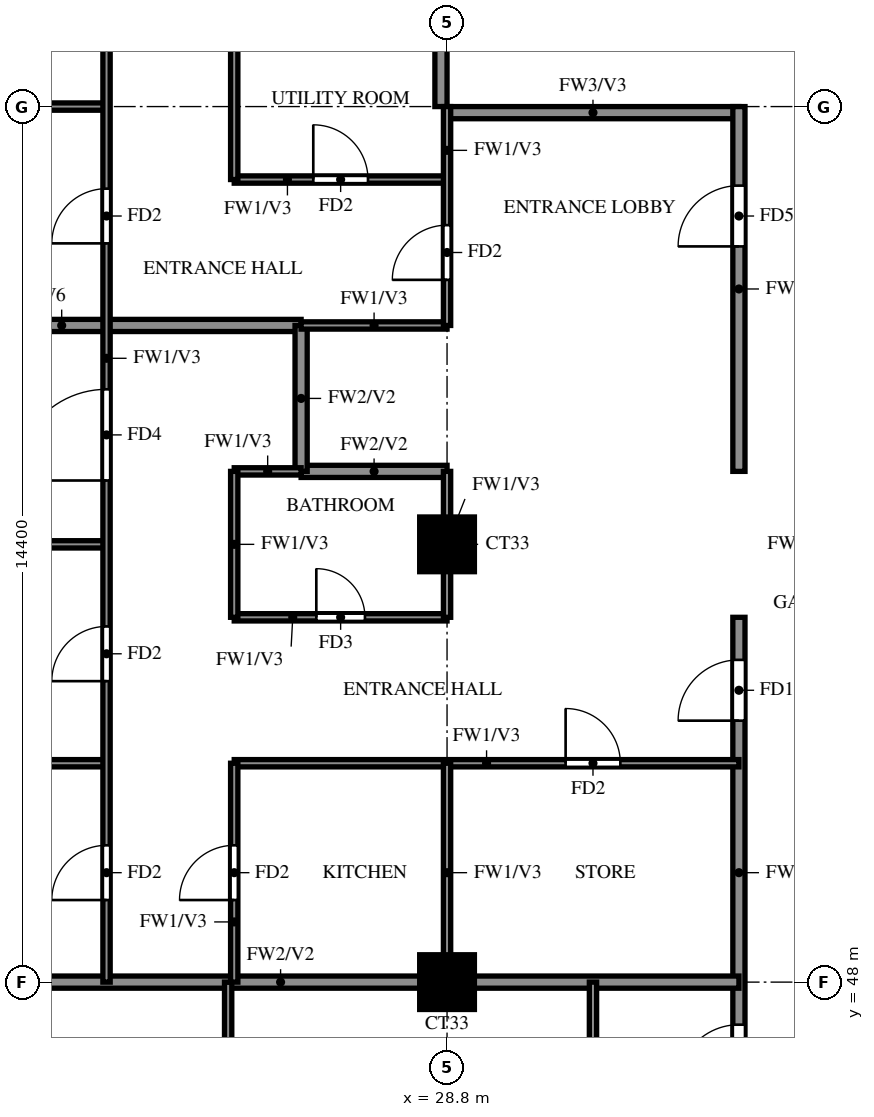
"""IFC4 building model, lengths in metres.
Left out: names, types, materials, properties, quantities, classifications, styles, units other than length and angle.
Written with IfcOpenShell. Run it as: python <this file> out.ifc"""

import sys

from ifc_helpers import new_model, si_unit, direction, frame, frame_2d, origin, origin_2d, place, context, subcontext, project, spatial, rectangle, extrude, source, transform, mapped, element, fill, save


model = new_model("IFC4")
c1 = context("Model", 3, precision=1e-05, world=origin(), true_north=direction((0.0, 1.0)))
c2 = subcontext(c1, "Body", "Model", "MODEL_VIEW")
j1 = project(units=[si_unit("LENGTHUNIT", "METRE"), si_unit("PLANEANGLEUNIT", "RADIAN")], contexts=[c1])
p1 = place(None, origin())
s1 = spatial("IfcSite", under=j1, at=p1, CompositionType="ELEMENT")
p2 = place(p1, origin())
s2 = spatial("IfcBuilding", under=s1, at=p2, CompositionType="ELEMENT")
p3 = place(p2, frame((0.0, 0.0, 215.0)))
s3 = spatial("IfcBuildingStorey", under=s2, at=p3, CompositionType="ELEMENT", Elevation=215.0)
m1 = source(origin(), c2, "Body", "SweptSolid", [
    extrude(rectangle(XDim=0.9, YDim=0.9, at=origin_2d()), origin(), (0.0, 0.0, 1.0), 3.22),
])
for number, where, z_axis, x_axis in (
    (1, (28.8, 48.0, 0.0), (0.0, 0.0, 1.0), (1.0, 0.0, 0.0)),
    (2, (28.8, 55.2, 0.0), (0.0, 0.0, 1.0), (1.0, 0.0, 0.0)),
):
    element("IfcColumn", number, at=place(p3, frame(where, z_axis=z_axis, x_axis=x_axis)), inside=s3, PredefinedType="COLUMN", context=c2, shape_type="MappedRepresentation", body=[
        mapped(m1, transform((0.0, 0.0, 0.0))),
    ])
p4 = place(p3, frame((28.8, 62.3, 0.0), z_axis=(0.0, 0.0, 1.0), x_axis=(1.0, 0.0, 0.0)))
e3 = element("IfcWall", 3, at=p4, inside=s3, PredefinedType="SOLIDWALL", context=c2, shape_type="SweptSolid", body=[
    extrude(rectangle(XDim=4.8, YDim=0.2, at=frame_2d((2.4, 0.0))), origin(), (0.0, 0.0, 1.0), 3.22),
])
p5 = place(p3, frame((28.7, 62.4, 0.0), z_axis=(0.0, 0.0, 1.0), x_axis=(0.0, 1.0, 0.0)))
e4 = element("IfcWall", 4, at=p5, inside=s3, PredefinedType="SOLIDWALL", context=c2, shape_type="SweptSolid", body=[
    extrude(rectangle(XDim=15.6, YDim=0.2, at=frame_2d((7.8, 0.0))), origin(), (0.0, 0.0, 1.0), 3.22),
])
p6 = place(p3, frame((33.6, 45.6, 0.0), z_axis=(0.0, 0.0, 1.0), x_axis=(0.0, 1.0, 0.0)))
e5 = element("IfcWall", 5, at=p6, inside=s3, PredefinedType="SOLIDWALL", context=c2, shape_type="SweptSolid", body=[
    extrude(rectangle(XDim=8.4, YDim=0.2, at=frame_2d((4.2, 0.0))), origin(), (0.0, 0.0, 1.0), 3.22),
])
p7 = place(p6, frame((0.7, 0.0, 0.0)))
e6 = element("IfcOpeningElement", 6, at=p7, cuts=e5, PredefinedType="OPENING", context=c2, shape_type="SweptSolid", body=[
    extrude(rectangle(XDim=1.0, YDim=2.1, at=frame_2d((0.5, 1.05))), frame((0.0, 0.11, 0.0), z_axis=(0.0, -1.0, 0.0), x_axis=(1.0, 0.0, 0.0)), (0.0, 0.0, 1.0), 0.22),
])
p8 = place(p6, frame((6.7, 0.0, 0.0)))
e7 = element("IfcOpeningElement", 7, at=p8, cuts=e5, PredefinedType="OPENING", context=c2, shape_type="SweptSolid", body=[
    extrude(rectangle(XDim=1.0, YDim=2.1, at=frame_2d((0.5, 1.05))), frame((0.0, 0.11, 0.0), z_axis=(0.0, -1.0, 0.0), x_axis=(1.0, 0.0, 0.0)), (0.0, 0.0, 1.0), 0.22),
])
p9 = place(p3, frame((33.6, 56.4, 0.0), z_axis=(0.0, 0.0, 1.0), x_axis=(0.0, 1.0, 0.0)))
e8 = element("IfcWall", 8, at=p9, inside=s3, PredefinedType="SOLIDWALL", context=c2, shape_type="SweptSolid", body=[
    extrude(rectangle(XDim=6.0, YDim=0.2, at=frame_2d((3.0, 0.0))), origin(), (0.0, 0.0, 1.0), 3.22),
])
p10 = place(p9, frame((3.7, 0.0, 0.0)))
e9 = element("IfcOpeningElement", 9, at=p10, cuts=e8, PredefinedType="OPENING", context=c2, shape_type="SweptSolid", body=[
    extrude(rectangle(XDim=1.0, YDim=2.1, at=frame_2d((0.5, 1.05))), frame((0.0, 0.11, 0.0), z_axis=(0.0, -1.0, 0.0), x_axis=(1.0, 0.0, 0.0)), (0.0, 0.0, 1.0), 0.22),
])
p11 = place(p3, frame((18.525, 48.0, 0.0), z_axis=(0.0, 0.0, 1.0), x_axis=(1.0, 0.0, 0.0)))
e10 = element("IfcWall", 10, at=p11, inside=s3, PredefinedType="SOLIDWALL", context=c2, shape_type="SweptSolid", body=[
    extrude(rectangle(XDim=15.075, YDim=0.2, at=frame_2d((7.538, 0.0))), origin(), (0.0, 0.0, 1.0), 3.22),
])
p12 = place(p3, frame((26.4, 56.4, 0.0), z_axis=(0.0, 0.0, 1.0), x_axis=(1.0, 0.0, 0.0)))
e11 = element("IfcWall", 11, at=p12, inside=s3, PredefinedType="SOLIDWALL", context=c2, shape_type="SweptSolid", body=[
    extrude(rectangle(XDim=2.4, YDim=0.2, at=frame_2d((1.2, 0.0))), origin(), (0.0, 0.0, 1.0), 3.22),
])
p13 = place(p3, frame((18.525, 58.8, 0.0), z_axis=(0.0, 0.0, 1.0), x_axis=(1.0, 0.0, 0.0)))
e12 = element("IfcWall", 12, at=p13, inside=s3, PredefinedType="SOLIDWALL", context=c2, shape_type="SweptSolid", body=[
    extrude(rectangle(XDim=7.875, YDim=0.2, at=frame_2d((3.938, 0.0))), origin(), (0.0, 0.0, 1.0), 2.32),
])
p14 = place(p3, frame((26.4, 56.4, 0.0), z_axis=(0.0, 0.0, 1.0), x_axis=(0.0, 1.0, 0.0)))
e13 = element("IfcWall", 13, at=p14, inside=s3, PredefinedType="SOLIDWALL", context=c2, shape_type="SweptSolid", body=[
    extrude(rectangle(XDim=2.4, YDim=0.2, at=frame_2d((1.2, 0.0))), origin(), (0.0, 0.0, 1.0), 3.22),
])
p15 = place(p3, frame((18.525, 51.6, 0.0), z_axis=(0.0, 0.0, 1.0), x_axis=(1.0, 0.0, 0.0)))
e14 = element("IfcWall", 14, at=p15, inside=s3, PredefinedType="PARTITIONING", context=c2, shape_type="SweptSolid", body=[
    extrude(rectangle(XDim=4.675, YDim=0.12, at=frame_2d((2.337, 0.0))), origin(), (0.0, 0.0, 1.0), 2.32),
])
p16 = place(p3, frame((25.3, 51.6, 0.0), z_axis=(0.0, 0.0, 1.0), x_axis=(1.0, 0.0, 0.0)))
e15 = element("IfcWall", 15, at=p16, inside=s3, PredefinedType="PARTITIONING", context=c2, shape_type="SweptSolid", body=[
    extrude(rectangle(XDim=8.3, YDim=0.12, at=frame_2d((4.15, 0.0))), origin(), (0.0, 0.0, 1.0), 3.22),
])
p17 = place(p16, frame((5.45, 0.0, 0.0)))
e16 = element("IfcOpeningElement", 16, at=p17, cuts=e15, PredefinedType="OPENING", context=c2, shape_type="SweptSolid", body=[
    extrude(rectangle(XDim=0.9, YDim=2.1, at=frame_2d((0.45, 1.05))), frame((0.0, 0.07, 0.0), z_axis=(0.0, -1.0, 0.0), x_axis=(1.0, 0.0, 0.0)), (0.0, 0.0, 1.0), 0.14),
])
p18 = place(p3, frame((25.3, 54.0, 0.0), z_axis=(0.0, 0.0, 1.0), x_axis=(1.0, 0.0, 0.0)))
e17 = element("IfcWall", 17, at=p18, inside=s3, PredefinedType="PARTITIONING", context=c2, shape_type="SweptSolid", body=[
    extrude(rectangle(XDim=3.5, YDim=0.12, at=frame_2d((1.75, 0.0))), origin(), (0.0, 0.0, 1.0), 3.22),
])
p19 = place(p18, frame((1.35, 0.0, 0.0)))
e18 = element("IfcOpeningElement", 18, at=p19, cuts=e17, PredefinedType="OPENING", context=c2, shape_type="SweptSolid", body=[
    extrude(rectangle(XDim=0.8, YDim=2.1, at=frame_2d((0.4, 1.05))), frame((0.0, 0.07, 0.0), z_axis=(0.0, -1.0, 0.0), x_axis=(1.0, 0.0, 0.0)), (0.0, 0.0, 1.0), 0.14),
])
p20 = place(p3, frame((18.525, 55.2, 0.0), z_axis=(0.0, 0.0, 1.0), x_axis=(1.0, 0.0, 0.0)))
e19 = element("IfcWall", 19, at=p20, inside=s3, PredefinedType="PARTITIONING", context=c2, shape_type="SweptSolid", body=[
    extrude(rectangle(XDim=4.675, YDim=0.12, at=frame_2d((2.337, 0.0))), origin(), (0.0, 0.0, 1.0), 3.22),
])
p21 = place(p3, frame((25.3, 56.4, 0.0), z_axis=(0.0, 0.0, 1.0), x_axis=(1.0, 0.0, 0.0)))
e20 = element("IfcWall", 20, at=p21, inside=s3, PredefinedType="PARTITIONING", context=c2, shape_type="SweptSolid", body=[
    extrude(rectangle(XDim=1.1, YDim=0.12, at=frame_2d((0.55, 0.0))), origin(), (0.0, 0.0, 1.0), 3.22),
])
p22 = place(p3, frame((26.4, 58.8, 0.0), z_axis=(0.0, 0.0, 1.0), x_axis=(1.0, 0.0, 0.0)))
e21 = element("IfcWall", 21, at=p22, inside=s3, PredefinedType="PARTITIONING", context=c2, shape_type="SweptSolid", body=[
    extrude(rectangle(XDim=2.4, YDim=0.12, at=frame_2d((1.2, 0.0))), origin(), (0.0, 0.0, 1.0), 3.22),
])
p23 = place(p3, frame((25.3, 61.2, 0.0), z_axis=(0.0, 0.0, 1.0), x_axis=(1.0, 0.0, 0.0)))
e22 = element("IfcWall", 22, at=p23, inside=s3, PredefinedType="PARTITIONING", context=c2, shape_type="SweptSolid", body=[
    extrude(rectangle(XDim=3.5, YDim=0.12, at=frame_2d((1.75, 0.0))), origin(), (0.0, 0.0, 1.0), 3.22),
])
p24 = place(p23, frame((1.3, 0.0, 0.0)))
e23 = element("IfcOpeningElement", 23, at=p24, cuts=e22, PredefinedType="OPENING", context=c2, shape_type="SweptSolid", body=[
    extrude(rectangle(XDim=0.9, YDim=2.1, at=frame_2d((0.45, 1.05))), frame((0.0, 0.07, 0.0), z_axis=(0.0, -1.0, 0.0), x_axis=(1.0, 0.0, 0.0)), (0.0, 0.0, 1.0), 0.14),
])
p25 = place(p3, frame((18.525, 62.4, 0.0), z_axis=(0.0, 0.0, 1.0), x_axis=(1.0, 0.0, 0.0)))
e24 = element("IfcWall", 24, at=p25, inside=s3, PredefinedType="PARTITIONING", context=c2, shape_type="SweptSolid", body=[
    extrude(rectangle(XDim=4.675, YDim=0.12, at=frame_2d((2.337, 0.0))), origin(), (0.0, 0.0, 1.0), 3.22),
])
p26 = place(p3, frame((23.2, 48.0, 0.0), z_axis=(0.0, 0.0, 1.0), x_axis=(0.0, 1.0, 0.0)))
e25 = element("IfcWall", 25, at=p26, inside=s3, PredefinedType="PARTITIONING", context=c2, shape_type="SweptSolid", body=[
    extrude(rectangle(XDim=21.6, YDim=0.12, at=frame_2d((10.8, 0.0))), origin(), (0.0, 0.0, 1.0), 3.22),
])
p27 = place(p26, frame((1.35, 0.0, 0.0)))
e26 = element("IfcOpeningElement", 26, at=p27, cuts=e25, PredefinedType="OPENING", context=c2, shape_type="SweptSolid", body=[
    extrude(rectangle(XDim=0.9, YDim=2.1, at=frame_2d((0.45, 1.05))), frame((0.0, 0.07, 0.0), z_axis=(0.0, -1.0, 0.0), x_axis=(1.0, 0.0, 0.0)), (0.0, 0.0, 1.0), 0.14),
])
p28 = place(p26, frame((4.95, 0.0, 0.0)))
e27 = element("IfcOpeningElement", 27, at=p28, cuts=e25, PredefinedType="OPENING", context=c2, shape_type="SweptSolid", body=[
    extrude(rectangle(XDim=0.9, YDim=2.1, at=frame_2d((0.45, 1.05))), frame((0.0, 0.07, 0.0), z_axis=(0.0, -1.0, 0.0), x_axis=(1.0, 0.0, 0.0)), (0.0, 0.0, 1.0), 0.14),
])
p29 = place(p26, frame((8.25, 0.0, 0.0)))
e28 = element("IfcOpeningElement", 28, at=p29, cuts=e25, PredefinedType="OPENING", context=c2, shape_type="SweptSolid", body=[
    extrude(rectangle(XDim=1.5, YDim=2.1, at=frame_2d((0.75, 1.05))), frame((0.0, 0.07, 0.0), z_axis=(0.0, -1.0, 0.0), x_axis=(1.0, 0.0, 0.0)), (0.0, 0.0, 1.0), 0.14),
])
p30 = place(p26, frame((12.15, 0.0, 0.0)))
e29 = element("IfcOpeningElement", 29, at=p30, cuts=e25, PredefinedType="OPENING", context=c2, shape_type="SweptSolid", body=[
    extrude(rectangle(XDim=0.9, YDim=2.1, at=frame_2d((0.45, 1.05))), frame((0.0, 0.07, 0.0), z_axis=(0.0, -1.0, 0.0), x_axis=(1.0, 0.0, 0.0)), (0.0, 0.0, 1.0), 0.14),
])
p31 = place(p26, frame((17.55, 0.0, 0.0)))
e30 = element("IfcOpeningElement", 30, at=p31, cuts=e25, PredefinedType="OPENING", context=c2, shape_type="SweptSolid", body=[
    extrude(rectangle(XDim=0.9, YDim=2.1, at=frame_2d((0.45, 1.05))), frame((0.0, 0.07, 0.0), z_axis=(0.0, -1.0, 0.0), x_axis=(1.0, 0.0, 0.0)), (0.0, 0.0, 1.0), 0.14),
])
p32 = place(p3, frame((25.2, 39.725, 0.0), z_axis=(0.0, 0.0, 1.0), x_axis=(0.0, 1.0, 0.0)))
e31 = element("IfcWall", 31, at=p32, inside=s3, PredefinedType="PARTITIONING", context=c2, shape_type="SweptSolid", body=[
    extrude(rectangle(XDim=8.275, YDim=0.12, at=frame_2d((4.137, 0.0))), origin(), (0.0, 0.0, 1.0), 3.22),
])
p33 = place(p32, frame((4.525, 0.0, 0.0)))
e32 = element("IfcOpeningElement", 32, at=p33, cuts=e31, PredefinedType="OPENING", context=c2, shape_type="SweptSolid", body=[
    extrude(rectangle(XDim=0.9, YDim=2.1, at=frame_2d((0.45, 1.05))), frame((0.0, 0.07, 0.0), z_axis=(0.0, -1.0, 0.0), x_axis=(1.0, 0.0, 0.0)), (0.0, 0.0, 1.0), 0.14),
])
p34 = place(p3, frame((25.3, 48.0, 0.0), z_axis=(0.0, 0.0, 1.0), x_axis=(0.0, 1.0, 0.0)))
e33 = element("IfcWall", 33, at=p34, inside=s3, PredefinedType="PARTITIONING", context=c2, shape_type="SweptSolid", body=[
    extrude(rectangle(XDim=3.6, YDim=0.12, at=frame_2d((1.8, 0.0))), origin(), (0.0, 0.0, 1.0), 3.22),
])
p35 = place(p34, frame((1.35, 0.0, 0.0)))
e34 = element("IfcOpeningElement", 34, at=p35, cuts=e33, PredefinedType="OPENING", context=c2, shape_type="SweptSolid", body=[
    extrude(rectangle(XDim=0.9, YDim=2.1, at=frame_2d((0.45, 1.05))), frame((0.0, 0.07, 0.0), z_axis=(0.0, -1.0, 0.0), x_axis=(1.0, 0.0, 0.0)), (0.0, 0.0, 1.0), 0.14),
])
p36 = place(p3, frame((25.3, 54.0, 0.0), z_axis=(0.0, 0.0, 1.0), x_axis=(0.0, 1.0, 0.0)))
e35 = element("IfcWall", 35, at=p36, inside=s3, PredefinedType="PARTITIONING", context=c2, shape_type="SweptSolid", body=[
    extrude(rectangle(XDim=2.4, YDim=0.12, at=frame_2d((1.2, 0.0))), origin(), (0.0, 0.0, 1.0), 3.22),
])
p37 = place(p3, frame((25.3, 61.2, 0.0), z_axis=(0.0, 0.0, 1.0), x_axis=(0.0, 1.0, 0.0)))
e36 = element("IfcWall", 36, at=p37, inside=s3, PredefinedType="PARTITIONING", context=c2, shape_type="SweptSolid", body=[
    extrude(rectangle(XDim=12.0, YDim=0.12, at=frame_2d((6.0, 0.0))), origin(), (0.0, 0.0, 1.0), 3.22),
])
p38 = place(p37, frame((4.2, 0.0, 0.0)))
e37 = element("IfcOpeningElement", 37, at=p38, cuts=e36, PredefinedType="OPENING", context=c2, shape_type="SweptSolid", body=[
    extrude(rectangle(XDim=0.9, YDim=2.1, at=frame_2d((0.45, 1.05))), frame((0.0, 0.07, 0.0), z_axis=(0.0, -1.0, 0.0), x_axis=(1.0, 0.0, 0.0)), (0.0, 0.0, 1.0), 0.14),
])
p39 = place(p37, frame((7.975, 0.0, 0.0)))
e38 = element("IfcOpeningElement", 38, at=p39, cuts=e36, PredefinedType="OPENING", context=c2, shape_type="SweptSolid", body=[
    extrude(rectangle(XDim=0.8, YDim=2.1, at=frame_2d((0.4, 1.05))), frame((0.0, 0.07, 0.0), z_axis=(0.0, -1.0, 0.0), x_axis=(1.0, 0.0, 0.0)), (0.0, 0.0, 1.0), 0.14),
])
p40 = place(p37, frame((10.45, 0.0, 0.0)))
e39 = element("IfcOpeningElement", 39, at=p40, cuts=e36, PredefinedType="OPENING", context=c2, shape_type="SweptSolid", body=[
    extrude(rectangle(XDim=0.8, YDim=2.1, at=frame_2d((0.4, 1.05))), frame((0.0, 0.07, 0.0), z_axis=(0.0, -1.0, 0.0), x_axis=(1.0, 0.0, 0.0)), (0.0, 0.0, 1.0), 0.14),
])
p41 = place(p3, frame((28.8, 48.0, 0.0), z_axis=(0.0, 0.0, 1.0), x_axis=(0.0, 1.0, 0.0)))
e40 = element("IfcWall", 40, at=p41, inside=s3, PredefinedType="PARTITIONING", context=c2, shape_type="SweptSolid", body=[
    extrude(rectangle(XDim=3.6, YDim=0.12, at=frame_2d((1.8, 0.0))), origin(), (0.0, 0.0, 1.0), 3.22),
])
p42 = place(p3, frame((28.8, 54.0, 0.0), z_axis=(0.0, 0.0, 1.0), x_axis=(0.0, 1.0, 0.0)))
e41 = element("IfcWall", 41, at=p42, inside=s3, PredefinedType="PARTITIONING", context=c2, shape_type="SweptSolid", body=[
    extrude(rectangle(XDim=2.4, YDim=0.12, at=frame_2d((1.2, 0.0))), origin(), (0.0, 0.0, 1.0), 3.22),
])
p43 = place(p3, frame((28.8, 58.8, 0.0), z_axis=(0.0, 0.0, 1.0), x_axis=(0.0, 1.0, 0.0)))
e42 = element("IfcWall", 42, at=p43, inside=s3, PredefinedType="PARTITIONING", context=c2, shape_type="SweptSolid", body=[
    extrude(rectangle(XDim=3.6, YDim=0.12, at=frame_2d((1.8, 0.0))), origin(), (0.0, 0.0, 1.0), 3.22),
])
p44 = place(p43, frame((0.75, 0.0, 0.0)))
e43 = element("IfcOpeningElement", 43, at=p44, cuts=e42, PredefinedType="OPENING", context=c2, shape_type="SweptSolid", body=[
    extrude(rectangle(XDim=0.9, YDim=2.1, at=frame_2d((0.45, 1.05))), frame((0.0, 0.07, 0.0), z_axis=(0.0, -1.0, 0.0), x_axis=(1.0, 0.0, 0.0)), (0.0, 0.0, 1.0), 0.14),
])
p45 = place(p3, frame((31.2, 45.6, 0.0), z_axis=(0.0, 0.0, 1.0), x_axis=(0.0, 1.0, 0.0)))
e44 = element("IfcWall", 44, at=p45, inside=s3, PredefinedType="PARTITIONING", context=c2, shape_type="SweptSolid", body=[
    extrude(rectangle(XDim=2.4, YDim=0.12, at=frame_2d((1.2, 0.0))), origin(), (0.0, 0.0, 1.0), 3.22),
])
p46 = place(p7, origin())
e45 = element("IfcDoor", 45, at=p46, inside=s3, OperationType="SINGLE_SWING_RIGHT", PredefinedType="DOOR", context=c2, shape_type="SweptSolid", body=[
    extrude(rectangle(XDim=1.0, YDim=2.1, at=frame_2d((0.5, 1.05))), frame((0.0, 0.025, 0.0), z_axis=(0.0, -1.0, 0.0), x_axis=(1.0, 0.0, 0.0)), (0.0, 0.0, 1.0), 0.05),
])
fill(e6, e45)
p47 = place(p8, origin())
e46 = element("IfcDoor", 46, at=p47, inside=s3, OperationType="SINGLE_SWING_RIGHT", PredefinedType="DOOR", context=c2, shape_type="SweptSolid", body=[
    extrude(rectangle(XDim=1.0, YDim=2.1, at=frame_2d((0.5, 1.05))), frame((0.0, 0.025, 0.0), z_axis=(0.0, -1.0, 0.0), x_axis=(1.0, 0.0, 0.0)), (0.0, 0.0, 1.0), 0.05),
])
fill(e7, e46)
p48 = place(p27, origin())
e47 = element("IfcDoor", 47, at=p48, inside=s3, OperationType="SINGLE_SWING_LEFT", PredefinedType="DOOR", context=c2, shape_type="SweptSolid", body=[
    extrude(rectangle(XDim=0.9, YDim=2.1, at=frame_2d((0.45, 1.05))), frame((0.0, 0.025, 0.0), z_axis=(0.0, -1.0, 0.0), x_axis=(1.0, 0.0, 0.0)), (0.0, 0.0, 1.0), 0.05),
])
fill(e26, e47)
p49 = place(p28, origin())
e48 = element("IfcDoor", 48, at=p49, inside=s3, OperationType="SINGLE_SWING_LEFT", PredefinedType="DOOR", context=c2, shape_type="SweptSolid", body=[
    extrude(rectangle(XDim=0.9, YDim=2.1, at=frame_2d((0.45, 1.05))), frame((0.0, 0.025, 0.0), z_axis=(0.0, -1.0, 0.0), x_axis=(1.0, 0.0, 0.0)), (0.0, 0.0, 1.0), 0.05),
])
fill(e27, e48)
p50 = place(p29, origin())
e49 = element("IfcDoor", 49, at=p50, inside=s3, OperationType="SINGLE_SWING_RIGHT", PredefinedType="DOOR", context=c2, shape_type="SweptSolid", body=[
    extrude(rectangle(XDim=1.5, YDim=2.1, at=frame_2d((0.75, 1.05))), frame((0.0, 0.025, 0.0), z_axis=(0.0, -1.0, 0.0), x_axis=(1.0, 0.0, 0.0)), (0.0, 0.0, 1.0), 0.05),
])
fill(e28, e49)
p51 = place(p35, origin())
e50 = element("IfcDoor", 50, at=p51, inside=s3, OperationType="SINGLE_SWING_LEFT", PredefinedType="DOOR", context=c2, shape_type="SweptSolid", body=[
    extrude(rectangle(XDim=0.9, YDim=2.1, at=frame_2d((0.45, 1.05))), frame((0.0, 0.025, 0.0), z_axis=(0.0, -1.0, 0.0), x_axis=(1.0, 0.0, 0.0)), (0.0, 0.0, 1.0), 0.05),
])
fill(e34, e50)
p52 = place(p19, origin())
e51 = element("IfcDoor", 51, at=p52, inside=s3, OperationType="SINGLE_SWING_LEFT", PredefinedType="DOOR", context=c2, shape_type="SweptSolid", body=[
    extrude(rectangle(XDim=0.8, YDim=2.1, at=frame_2d((0.4, 1.05))), frame((0.0, 0.025, 0.0), z_axis=(0.0, -1.0, 0.0), x_axis=(1.0, 0.0, 0.0)), (0.0, 0.0, 1.0), 0.05),
])
fill(e18, e51)
p53 = place(p17, origin())
e52 = element("IfcDoor", 52, at=p53, inside=s3, OperationType="SINGLE_SWING_RIGHT", PredefinedType="DOOR", context=c2, shape_type="SweptSolid", body=[
    extrude(rectangle(XDim=0.9, YDim=2.1, at=frame_2d((0.45, 1.05))), frame((0.0, 0.025, 0.0), z_axis=(0.0, -1.0, 0.0), x_axis=(1.0, 0.0, 0.0)), (0.0, 0.0, 1.0), 0.05),
])
fill(e16, e52)
p54 = place(p44, origin())
e53 = element("IfcDoor", 53, at=p54, inside=s3, OperationType="SINGLE_SWING_LEFT", PredefinedType="DOOR", context=c2, shape_type="SweptSolid", body=[
    extrude(rectangle(XDim=0.9, YDim=2.1, at=frame_2d((0.45, 1.05))), frame((0.0, 0.025, 0.0), z_axis=(0.0, -1.0, 0.0), x_axis=(1.0, 0.0, 0.0)), (0.0, 0.0, 1.0), 0.05),
])
fill(e43, e53)
p55 = place(p10, origin())
e54 = element("IfcDoor", 54, at=p55, inside=s3, OperationType="SINGLE_SWING_LEFT", PredefinedType="DOOR", context=c2, shape_type="SweptSolid", body=[
    extrude(rectangle(XDim=1.0, YDim=2.1, at=frame_2d((0.5, 1.05))), frame((0.0, 0.025, 0.0), z_axis=(0.0, -1.0, 0.0), x_axis=(1.0, 0.0, 0.0)), (0.0, 0.0, 1.0), 0.05),
])
fill(e9, e54)
p56 = place(p30, origin())
e55 = element("IfcDoor", 55, at=p56, inside=s3, OperationType="SINGLE_SWING_RIGHT", PredefinedType="DOOR", context=c2, shape_type="SweptSolid", body=[
    extrude(rectangle(XDim=0.9, YDim=2.1, at=frame_2d((0.45, 1.05))), frame((0.0, 0.025, 0.0), z_axis=(0.0, -1.0, 0.0), x_axis=(1.0, 0.0, 0.0)), (0.0, 0.0, 1.0), 0.05),
])
fill(e29, e55)
p57 = place(p24, origin())
e56 = element("IfcDoor", 56, at=p57, inside=s3, OperationType="SINGLE_SWING_LEFT", PredefinedType="DOOR", context=c2, shape_type="SweptSolid", body=[
    extrude(rectangle(XDim=0.9, YDim=2.1, at=frame_2d((0.45, 1.05))), frame((0.0, 0.025, 0.0), z_axis=(0.0, -1.0, 0.0), x_axis=(1.0, 0.0, 0.0)), (0.0, 0.0, 1.0), 0.05),
])
fill(e23, e56)
save(model, sys.argv[1])
